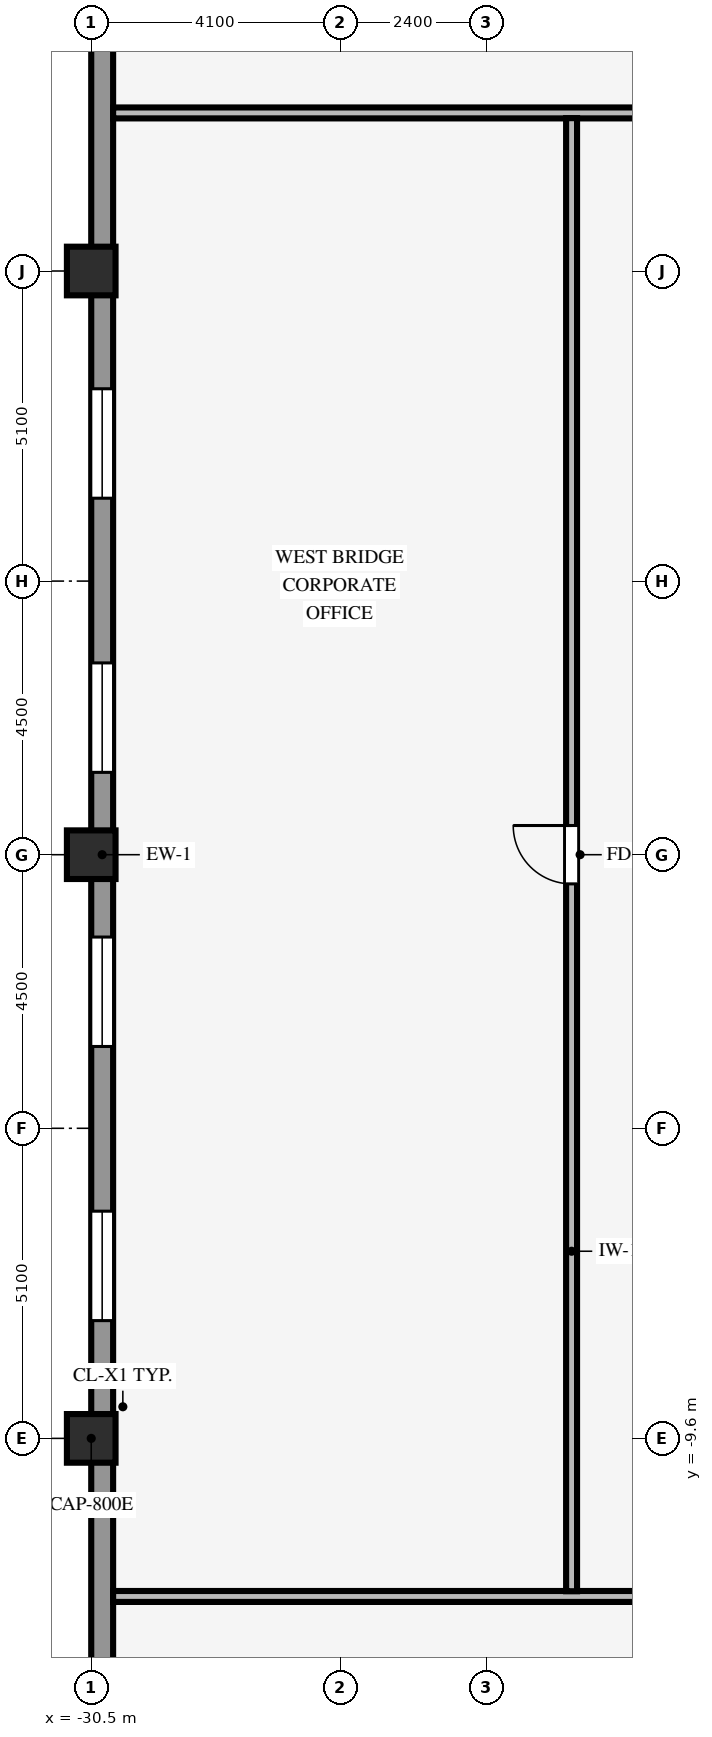
"""IFC4 building model, lengths in metres.
Left out: names, types, materials, properties, quantities, classifications, styles, units other than length and angle.
Written with IfcOpenShell. Run it as: python <this file> out.ifc"""

import sys

from ifc_helpers import new_model, si_unit, direction, frame, frame_2d, origin, origin_2d, place, context, subcontext, project, spatial, rectangle, hollow_rectangle, extrude, source, transform, mapped, element, fill, save


model = new_model("IFC4")
c1 = context("Model", 3, precision=1e-05, world=origin(), true_north=direction((0.0, 1.0)))
c2 = subcontext(c1, "Body", "Model", "MODEL_VIEW")
j1 = project(units=[si_unit("LENGTHUNIT", "METRE"), si_unit("PLANEANGLEUNIT", "RADIAN")], contexts=[c1])
p1 = place(None, origin())
s1 = spatial("IfcSite", under=j1, at=p1, CompositionType="ELEMENT")
p2 = place(p1, origin())
s2 = spatial("IfcBuilding", under=s1, at=p2, CompositionType="ELEMENT")
p3 = place(p2, frame((0.0, 0.0, 23.0)))
s3 = spatial("IfcBuildingStorey", under=s2, at=p3, CompositionType="ELEMENT", Elevation=23.0)
for number, where, z_axis, x_axis in (
    (1, (-30.5, -9.6, 0.0), (0.0, 0.0, 1.0), (1.0, 0.0, 0.0)),
    (2, (-30.5, 0.0, 0.0), (0.0, 0.0, 1.0), (1.0, 0.0, 0.0)),
    (3, (-30.5, 9.6, 0.0), (0.0, 0.0, 1.0), (1.0, 0.0, 0.0)),
):
    element("IfcColumn", number, at=place(p3, frame(where, z_axis=z_axis, x_axis=x_axis)), inside=s3, PredefinedType="COLUMN", context=c2, shape_type="SweptSolid", body=[
        extrude(hollow_rectangle(XDim=0.8, YDim=0.8, WallThickness=0.055, InnerFilletRadius=0.055, OuterFilletRadius=0.11, at=origin_2d()), origin(), (0.0, 0.0, 1.0), 4.2),
    ])
p4 = place(p3, frame((-30.32, -23.544, 0.0), z_axis=(0.0, 0.0, 1.0), x_axis=(0.0, 1.0, 0.0)))
e4 = element("IfcWall", 4, at=p4, inside=s3, PredefinedType="STANDARD", context=c2, shape_type="SweptSolid", body=[
    extrude(rectangle(XDim=47.088, YDim=0.36, at=frame_2d((23.544, 0.0))), origin(), (0.0, 0.0, 1.0), 3.702),
])
p5 = place(p4, frame((2.354, 0.0, 0.85)))
e5 = element("IfcOpeningElement", 5, at=p5, cuts=e4, PredefinedType="OPENING", context=c2, shape_type="SweptSolid", body=[
    extrude(rectangle(XDim=1.8, YDim=2.35, at=frame_2d((0.9, 1.175))), frame((0.0, 0.19, 0.0), z_axis=(0.0, -1.0, 0.0), x_axis=(1.0, 0.0, 0.0)), (0.0, 0.0, 1.0), 0.38),
])
p6 = place(p4, frame((7.313, 0.0, 0.85)))
e6 = element("IfcOpeningElement", 6, at=p6, cuts=e4, PredefinedType="OPENING", context=c2, shape_type="SweptSolid", body=[
    extrude(rectangle(XDim=1.8, YDim=2.35, at=frame_2d((0.9, 1.175))), frame((0.0, 0.19, 0.0), z_axis=(0.0, -1.0, 0.0), x_axis=(1.0, 0.0, 0.0)), (0.0, 0.0, 1.0), 0.38),
])
p7 = place(p4, frame((15.881, 0.0, 0.85)))
e7 = element("IfcOpeningElement", 7, at=p7, cuts=e4, PredefinedType="OPENING", context=c2, shape_type="SweptSolid", body=[
    extrude(rectangle(XDim=1.8, YDim=2.35, at=frame_2d((0.9, 1.175))), frame((0.0, 0.19, 0.0), z_axis=(0.0, -1.0, 0.0), x_axis=(1.0, 0.0, 0.0)), (0.0, 0.0, 1.0), 0.38),
])
p8 = place(p4, frame((20.39, 0.0, 0.85)))
e8 = element("IfcOpeningElement", 8, at=p8, cuts=e4, PredefinedType="OPENING", context=c2, shape_type="SweptSolid", body=[
    extrude(rectangle(XDim=1.8, YDim=2.35, at=frame_2d((0.9, 1.175))), frame((0.0, 0.19, 0.0), z_axis=(0.0, -1.0, 0.0), x_axis=(1.0, 0.0, 0.0)), (0.0, 0.0, 1.0), 0.38),
])
p9 = place(p4, frame((24.898, 0.0, 0.85)))
e9 = element("IfcOpeningElement", 9, at=p9, cuts=e4, PredefinedType="OPENING", context=c2, shape_type="SweptSolid", body=[
    extrude(rectangle(XDim=1.8, YDim=2.35, at=frame_2d((0.9, 1.175))), frame((0.0, 0.19, 0.0), z_axis=(0.0, -1.0, 0.0), x_axis=(1.0, 0.0, 0.0)), (0.0, 0.0, 1.0), 0.38),
])
p10 = place(p4, frame((29.407, 0.0, 0.85)))
e10 = element("IfcOpeningElement", 10, at=p10, cuts=e4, PredefinedType="OPENING", context=c2, shape_type="SweptSolid", body=[
    extrude(rectangle(XDim=1.8, YDim=2.35, at=frame_2d((0.9, 1.175))), frame((0.0, 0.19, 0.0), z_axis=(0.0, -1.0, 0.0), x_axis=(1.0, 0.0, 0.0)), (0.0, 0.0, 1.0), 0.38),
])
p11 = place(p4, frame((37.975, 0.0, 0.85)))
e11 = element("IfcOpeningElement", 11, at=p11, cuts=e4, PredefinedType="OPENING", context=c2, shape_type="SweptSolid", body=[
    extrude(rectangle(XDim=1.8, YDim=2.35, at=frame_2d((0.9, 1.175))), frame((0.0, 0.19, 0.0), z_axis=(0.0, -1.0, 0.0), x_axis=(1.0, 0.0, 0.0)), (0.0, 0.0, 1.0), 0.38),
])
p12 = place(p4, frame((42.934, 0.0, 0.85)))
e12 = element("IfcOpeningElement", 12, at=p12, cuts=e4, PredefinedType="OPENING", context=c2, shape_type="SweptSolid", body=[
    extrude(rectangle(XDim=1.8, YDim=2.35, at=frame_2d((0.9, 1.175))), frame((0.0, 0.19, 0.0), z_axis=(0.0, -1.0, 0.0), x_axis=(1.0, 0.0, 0.0)), (0.0, 0.0, 1.0), 0.38),
])
p13 = place(p3, frame((-30.14, -12.2, 0.0), z_axis=(0.0, 0.0, 1.0), x_axis=(1.0, 0.0, 0.0)))
e13 = element("IfcWall", 13, at=p13, inside=s3, PredefinedType="PARTITIONING", context=c2, shape_type="SweptSolid", body=[
    extrude(rectangle(XDim=18.74, YDim=0.18, at=frame_2d((9.37, 0.0))), origin(), (0.0, 0.0, 1.0), 4.19),
])
p14 = place(p13, frame((14.06, 0.0, 0.0)))
e14 = element("IfcOpeningElement", 14, at=p14, cuts=e13, PredefinedType="OPENING", context=c2, shape_type="SweptSolid", body=[
    extrude(rectangle(XDim=0.96, YDim=2.1, at=frame_2d((0.48, 1.05))), frame((0.0, 0.1, 0.0), z_axis=(0.0, -1.0, 0.0), x_axis=(1.0, 0.0, 0.0)), (0.0, 0.0, 1.0), 0.2),
])
p15 = place(p3, frame((-30.14, 12.2, 0.0), z_axis=(0.0, 0.0, 1.0), x_axis=(1.0, 0.0, 0.0)))
e15 = element("IfcWall", 15, at=p15, inside=s3, PredefinedType="PARTITIONING", context=c2, shape_type="SweptSolid", body=[
    extrude(rectangle(XDim=18.74, YDim=0.18, at=frame_2d((9.37, 0.0))), origin(), (0.0, 0.0, 1.0), 4.19),
])
p16 = place(p15, frame((14.06, 0.0, 0.0)))
e16 = element("IfcOpeningElement", 16, at=p16, cuts=e15, PredefinedType="OPENING", context=c2, shape_type="SweptSolid", body=[
    extrude(rectangle(XDim=0.96, YDim=2.1, at=frame_2d((0.48, 1.05))), frame((0.0, 0.1, 0.0), z_axis=(0.0, -1.0, 0.0), x_axis=(1.0, 0.0, 0.0)), (0.0, 0.0, 1.0), 0.2),
])
p17 = place(p3, frame((-22.6, -12.114, 0.0), z_axis=(0.0, 0.0, 1.0), x_axis=(0.0, 1.0, 0.0)))
e17 = element("IfcWall", 17, at=p17, inside=s3, PredefinedType="PARTITIONING", context=c2, shape_type="SweptSolid", body=[
    extrude(rectangle(XDim=24.228, YDim=0.18, at=frame_2d((12.114, 0.0))), origin(), (0.0, 0.0, 1.0), 4.19),
])
p18 = place(p17, frame((11.634, 0.0, 0.0)))
e18 = element("IfcOpeningElement", 18, at=p18, cuts=e17, PredefinedType="OPENING", context=c2, shape_type="SweptSolid", body=[
    extrude(rectangle(XDim=0.96, YDim=2.1, at=frame_2d((0.48, 1.05))), frame((0.0, 0.1, 0.0), z_axis=(0.0, -1.0, 0.0), x_axis=(1.0, 0.0, 0.0)), (0.0, 0.0, 1.0), 0.2),
])
m1 = source(origin(), c2, "Body", "SweptSolid", [
    extrude(rectangle(XDim=1.8, YDim=2.35, at=frame_2d((0.9, 1.175))), frame((0.0, 0.03, 0.0), z_axis=(0.0, -1.0, 0.0), x_axis=(1.0, 0.0, 0.0)), (0.0, 0.0, 1.0), 0.06),
])
p19 = place(p7, origin())
e19 = element("IfcWindow", 19, at=p19, inside=s3, PartitioningType="SINGLE_PANEL", PredefinedType="WINDOW", context=c2, shape_type="MappedRepresentation", body=[
    mapped(m1, transform((0.0, 0.0, 0.0), scale=1.0)),
])
fill(e7, e19)
p20 = place(p8, origin())
e20 = element("IfcWindow", 20, at=p20, inside=s3, PartitioningType="SINGLE_PANEL", PredefinedType="WINDOW", context=c2, shape_type="MappedRepresentation", body=[
    mapped(m1, transform((0.0, 0.0, 0.0), scale=1.0)),
])
fill(e8, e20)
p21 = place(p9, origin())
e21 = element("IfcWindow", 21, at=p21, inside=s3, PartitioningType="SINGLE_PANEL", PredefinedType="WINDOW", context=c2, shape_type="MappedRepresentation", body=[
    mapped(m1, transform((0.0, 0.0, 0.0), scale=1.0)),
])
fill(e9, e21)
p22 = place(p10, origin())
e22 = element("IfcWindow", 22, at=p22, inside=s3, PartitioningType="SINGLE_PANEL", PredefinedType="WINDOW", context=c2, shape_type="MappedRepresentation", body=[
    mapped(m1, transform((0.0, 0.0, 0.0), scale=1.0)),
])
fill(e10, e22)
m2 = source(origin(), c2, "Body", "SweptSolid", [
    extrude(rectangle(XDim=0.96, YDim=2.1, at=frame_2d((0.48, 1.05))), frame((0.0, 0.025, 0.0), z_axis=(0.0, -1.0, 0.0), x_axis=(1.0, 0.0, 0.0)), (0.0, 0.0, 1.0), 0.05),
])
p23 = place(p18, origin())
e23 = element("IfcDoor", 23, at=p23, inside=s3, OperationType="SINGLE_SWING_RIGHT", PredefinedType="DOOR", context=c2, shape_type="MappedRepresentation", body=[
    mapped(m2, transform((0.0, 0.0, 0.0), scale=1.0)),
])
fill(e18, e23)
save(model, sys.argv[1])
